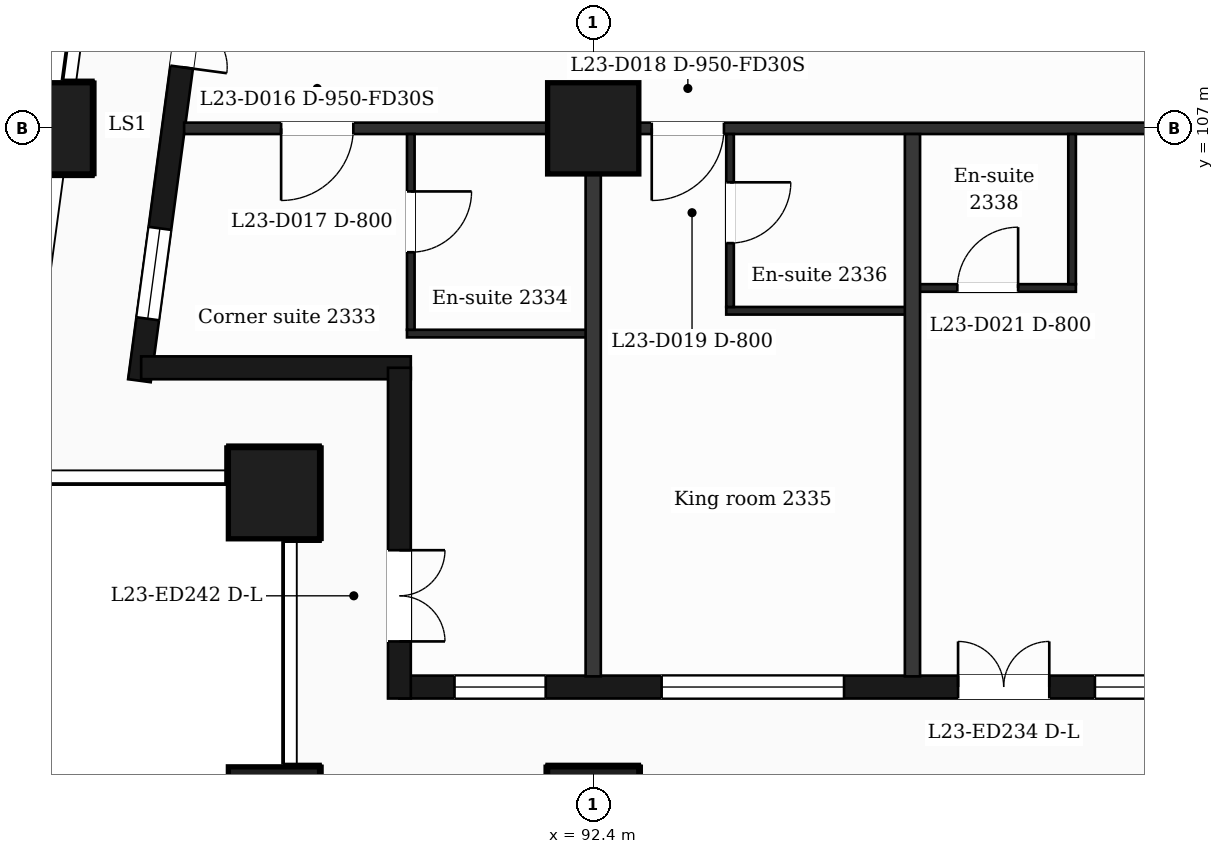
"""IFC4 building model, lengths in metres.
Left out: names, types, materials, properties, quantities, classifications, styles, units other than length and angle.
Written with IfcOpenShell. Run it as: python <this file> out.ifc"""

import sys

from ifc_helpers import new_model, si_unit, direction, frame, frame_2d, origin, origin_2d, place, context, subcontext, project, spatial, rectangle, extrude, element, fill, save


model = new_model("IFC4")
c1 = context("Model", 3, precision=1e-05, world=origin(), true_north=direction((0.0, 1.0)))
c2 = subcontext(c1, "Body", "Model", "MODEL_VIEW")
j1 = project(units=[si_unit("LENGTHUNIT", "METRE"), si_unit("PLANEANGLEUNIT", "RADIAN")], contexts=[c1])
p1 = place(None, origin())
s1 = spatial("IfcSite", under=j1, at=p1, CompositionType="ELEMENT")
p2 = place(p1, origin())
s2 = spatial("IfcBuilding", under=s1, at=p2, CompositionType="ELEMENT")
p3 = place(p2, frame((0.0, 0.0, 102.1)))
s3 = spatial("IfcBuildingStorey", under=s2, at=p3, CompositionType="ELEMENT", Elevation=102.1)
for number, where, z_axis, x_axis in (
    (1, (92.4, 98.0, 0.0), (0.0, 0.0, 1.0), (1.0, 0.0, 0.0)),
    (2, (88.2, 98.0, 0.0), (0.0, 0.0, 1.0), (1.0, 0.0, 0.0)),
    (3, (88.2, 102.2, 0.0), (0.0, 0.0, 1.0), (1.0, 0.0, 0.0)),
    (4, (92.4, 107.0, 0.0), (0.0, 0.0, 1.0), (1.0, 0.0, 0.0)),
    (5, (85.211, 107.0, 0.0), (0.0, 0.0, 1.0), (1.0, 0.0, 0.0)),
):
    element("IfcColumn", number, at=place(p3, frame(where, z_axis=z_axis, x_axis=x_axis)), inside=s3, PredefinedType="COLUMN", context=c2, shape_type="SweptSolid", body=[
        extrude(rectangle(XDim=1.2, YDim=1.2, at=origin_2d()), origin(), (0.0, 0.0, 1.0), 3.7),
    ])
p4 = place(p3, frame((89.85, 99.65, 0.0), z_axis=(0.0, 0.0, 1.0), x_axis=(1.0, 0.0, 0.0)))
e6 = element("IfcWall", 6, at=p4, inside=s3, PredefinedType="SOLIDWALL", context=c2, shape_type="SweptSolid", body=[
    extrude(rectangle(XDim=47.25, YDim=0.3, at=frame_2d((23.625, 0.0))), origin(), (0.0, 0.0, 1.0), 3.38),
])
p5 = place(p4, frame((0.725, 0.0, 0.9)))
e7 = element("IfcOpeningElement", 7, at=p5, cuts=e6, PredefinedType="OPENING", context=c2, shape_type="SweptSolid", body=[
    extrude(rectangle(XDim=1.2, YDim=2.1, at=frame_2d((0.6, 1.05))), frame((0.0, 0.16, 0.0), z_axis=(0.0, -1.0, 0.0), x_axis=(1.0, 0.0, 0.0)), (0.0, 0.0, 1.0), 0.32),
])
p6 = place(p4, frame((3.45, 0.0, 0.9)))
e8 = element("IfcOpeningElement", 8, at=p6, cuts=e6, PredefinedType="OPENING", context=c2, shape_type="SweptSolid", body=[
    extrude(rectangle(XDim=2.4, YDim=2.1, at=frame_2d((1.2, 1.05))), frame((0.0, 0.16, 0.0), z_axis=(0.0, -1.0, 0.0), x_axis=(1.0, 0.0, 0.0)), (0.0, 0.0, 1.0), 0.32),
])
p7 = place(p4, frame((7.35, 0.0, 0.0)))
e9 = element("IfcOpeningElement", 9, at=p7, cuts=e6, PredefinedType="OPENING", context=c2, shape_type="SweptSolid", body=[
    extrude(rectangle(XDim=1.2, YDim=2.4, at=frame_2d((0.6, 1.2))), frame((0.0, 0.16, 0.0), z_axis=(0.0, -1.0, 0.0), x_axis=(1.0, 0.0, 0.0)), (0.0, 0.0, 1.0), 0.32),
])
p8 = place(p4, frame((9.15, 0.0, 0.9)))
e10 = element("IfcOpeningElement", 10, at=p8, cuts=e6, PredefinedType="OPENING", context=c2, shape_type="SweptSolid", body=[
    extrude(rectangle(XDim=1.2, YDim=2.1, at=frame_2d((0.6, 1.05))), frame((0.0, 0.16, 0.0), z_axis=(0.0, -1.0, 0.0), x_axis=(1.0, 0.0, 0.0)), (0.0, 0.0, 1.0), 0.32),
])
p9 = place(p4, frame((11.85, 0.0, 0.9)))
e11 = element("IfcOpeningElement", 11, at=p9, cuts=e6, PredefinedType="OPENING", context=c2, shape_type="SweptSolid", body=[
    extrude(rectangle(XDim=2.4, YDim=2.1, at=frame_2d((1.2, 1.05))), frame((0.0, 0.16, 0.0), z_axis=(0.0, -1.0, 0.0), x_axis=(1.0, 0.0, 0.0)), (0.0, 0.0, 1.0), 0.32),
])
p10 = place(p4, frame((16.05, 0.0, 0.9)))
e12 = element("IfcOpeningElement", 12, at=p10, cuts=e6, PredefinedType="OPENING", context=c2, shape_type="SweptSolid", body=[
    extrude(rectangle(XDim=2.4, YDim=2.1, at=frame_2d((1.2, 1.05))), frame((0.0, 0.16, 0.0), z_axis=(0.0, -1.0, 0.0), x_axis=(1.0, 0.0, 0.0)), (0.0, 0.0, 1.0), 0.32),
])
p11 = place(p4, frame((20.85, 0.0, 0.9)))
e13 = element("IfcOpeningElement", 13, at=p11, cuts=e6, PredefinedType="OPENING", context=c2, shape_type="SweptSolid", body=[
    extrude(rectangle(XDim=1.2, YDim=2.1, at=frame_2d((0.6, 1.05))), frame((0.0, 0.16, 0.0), z_axis=(0.0, -1.0, 0.0), x_axis=(1.0, 0.0, 0.0)), (0.0, 0.0, 1.0), 0.32),
])
p12 = place(p4, frame((25.05, 0.0, 0.9)))
e14 = element("IfcOpeningElement", 14, at=p12, cuts=e6, PredefinedType="OPENING", context=c2, shape_type="SweptSolid", body=[
    extrude(rectangle(XDim=1.2, YDim=2.1, at=frame_2d((0.6, 1.05))), frame((0.0, 0.16, 0.0), z_axis=(0.0, -1.0, 0.0), x_axis=(1.0, 0.0, 0.0)), (0.0, 0.0, 1.0), 0.32),
])
p13 = place(p4, frame((28.65, 0.0, 0.9)))
e15 = element("IfcOpeningElement", 15, at=p13, cuts=e6, PredefinedType="OPENING", context=c2, shape_type="SweptSolid", body=[
    extrude(rectangle(XDim=2.4, YDim=2.1, at=frame_2d((1.2, 1.05))), frame((0.0, 0.16, 0.0), z_axis=(0.0, -1.0, 0.0), x_axis=(1.0, 0.0, 0.0)), (0.0, 0.0, 1.0), 0.32),
])
p14 = place(p4, frame((32.85, 0.0, 0.9)))
e16 = element("IfcOpeningElement", 16, at=p14, cuts=e6, PredefinedType="OPENING", context=c2, shape_type="SweptSolid", body=[
    extrude(rectangle(XDim=2.4, YDim=2.1, at=frame_2d((1.2, 1.05))), frame((0.0, 0.16, 0.0), z_axis=(0.0, -1.0, 0.0), x_axis=(1.0, 0.0, 0.0)), (0.0, 0.0, 1.0), 0.32),
])
p15 = place(p4, frame((37.05, 0.0, 0.9)))
e17 = element("IfcOpeningElement", 17, at=p15, cuts=e6, PredefinedType="OPENING", context=c2, shape_type="SweptSolid", body=[
    extrude(rectangle(XDim=2.4, YDim=2.1, at=frame_2d((1.2, 1.05))), frame((0.0, 0.16, 0.0), z_axis=(0.0, -1.0, 0.0), x_axis=(1.0, 0.0, 0.0)), (0.0, 0.0, 1.0), 0.32),
])
p16 = place(p4, frame((41.25, 0.0, 0.9)))
e18 = element("IfcOpeningElement", 18, at=p16, cuts=e6, PredefinedType="OPENING", context=c2, shape_type="SweptSolid", body=[
    extrude(rectangle(XDim=2.4, YDim=2.1, at=frame_2d((1.2, 1.05))), frame((0.0, 0.16, 0.0), z_axis=(0.0, -1.0, 0.0), x_axis=(1.0, 0.0, 0.0)), (0.0, 0.0, 1.0), 0.32),
])
p17 = place(p4, frame((45.25, 0.0, 0.9)))
e19 = element("IfcOpeningElement", 19, at=p17, cuts=e6, PredefinedType="OPENING", context=c2, shape_type="SweptSolid", body=[
    extrude(rectangle(XDim=1.2, YDim=2.1, at=frame_2d((0.6, 1.05))), frame((0.0, 0.16, 0.0), z_axis=(0.0, -1.0, 0.0), x_axis=(1.0, 0.0, 0.0)), (0.0, 0.0, 1.0), 0.32),
])
p18 = place(p3, frame((87.334, 110.4, 0.0), z_axis=(0.0, 0.0, 1.0), x_axis=(-0.133437175554, -0.991057273915, 0.0)))
e20 = element("IfcWall", 20, at=p18, inside=s3, PredefinedType="SOLIDWALL", context=c2, shape_type="SweptSolid", body=[
    extrude(rectangle(XDim=6.781, YDim=0.3, at=frame_2d((3.39, 0.0))), origin(), (0.0, 0.0, 1.0), 3.38),
])
p19 = place(p18, frame((1.418, 0.0, 0.0)))
e21 = element("IfcOpeningElement", 21, at=p19, cuts=e20, PredefinedType="OPENING", context=c2, shape_type="SweptSolid", body=[
    extrude(rectangle(XDim=1.2, YDim=2.4, at=frame_2d((0.6, 1.2))), frame((0.0, 0.16, 0.0), z_axis=(0.0, -1.0, 0.0), x_axis=(1.0, 0.0, 0.0)), (0.0, 0.0, 1.0), 0.32),
])
p20 = place(p18, frame((4.758, 0.0, 0.9)))
e22 = element("IfcOpeningElement", 22, at=p20, cuts=e20, PredefinedType="OPENING", context=c2, shape_type="SweptSolid", body=[
    extrude(rectangle(XDim=1.2, YDim=2.1, at=frame_2d((0.6, 1.05))), frame((0.0, 0.16, 0.0), z_axis=(0.0, -1.0, 0.0), x_axis=(1.0, 0.0, 0.0)), (0.0, 0.0, 1.0), 0.32),
])
p21 = place(p3, frame((86.452, 103.85, 0.0), z_axis=(0.0, 0.0, 1.0), x_axis=(1.0, 0.0, 0.0)))
e23 = element("IfcWall", 23, at=p21, inside=s3, PredefinedType="SOLIDWALL", context=c2, shape_type="SweptSolid", body=[
    extrude(rectangle(XDim=3.548, YDim=0.3, at=frame_2d((1.774, 0.0))), origin(), (0.0, 0.0, 1.0), 3.38),
])
p22 = place(p3, frame((89.85, 103.85, 0.0), z_axis=(0.0, 0.0, 1.0), x_axis=(0.0, -1.0, 0.0)))
e24 = element("IfcWall", 24, at=p22, inside=s3, PredefinedType="SOLIDWALL", context=c2, shape_type="SweptSolid", body=[
    extrude(rectangle(XDim=4.35, YDim=0.3, at=frame_2d((2.175, 0.0))), origin(), (0.0, 0.0, 1.0), 3.38),
])
p23 = place(p22, frame((2.4, 0.0, 0.0)))
e25 = element("IfcOpeningElement", 25, at=p23, cuts=e24, PredefinedType="OPENING", context=c2, shape_type="SweptSolid", body=[
    extrude(rectangle(XDim=1.2, YDim=2.4, at=frame_2d((0.6, 1.2))), frame((0.0, 0.16, 0.0), z_axis=(0.0, -1.0, 0.0), x_axis=(1.0, 0.0, 0.0)), (0.0, 0.0, 1.0), 0.32),
])
p24 = place(p3, frame((89.95, 104.3, 0.0), z_axis=(0.0, 0.0, 1.0), x_axis=(1.0, 0.0, 0.0)))
e26 = element("IfcWall", 26, at=p24, inside=s3, PredefinedType="PARTITIONING", context=c2, shape_type="SweptSolid", body=[
    extrude(rectangle(XDim=2.45, YDim=0.1, at=frame_2d((1.225, 0.0))), origin(), (0.0, 0.0, 1.0), 3.38),
])
p25 = place(p3, frame((94.15, 104.6, 0.0), z_axis=(0.0, 0.0, 1.0), x_axis=(1.0, 0.0, 0.0)))
e27 = element("IfcWall", 27, at=p25, inside=s3, PredefinedType="PARTITIONING", context=c2, shape_type="SweptSolid", body=[
    extrude(rectangle(XDim=2.45, YDim=0.1, at=frame_2d((1.225, 0.0))), origin(), (0.0, 0.0, 1.0), 3.38),
])
p26 = place(p3, frame((96.6, 104.9, 0.0), z_axis=(0.0, 0.0, 1.0), x_axis=(1.0, 0.0, 0.0)))
e28 = element("IfcWall", 28, at=p26, inside=s3, PredefinedType="PARTITIONING", context=c2, shape_type="SweptSolid", body=[
    extrude(rectangle(XDim=2.15, YDim=0.1, at=frame_2d((1.075, 0.0))), origin(), (0.0, 0.0, 1.0), 3.38),
])
p27 = place(p26, frame((0.59, 0.0, 0.0)))
e29 = element("IfcOpeningElement", 29, at=p27, cuts=e28, PredefinedType="OPENING", context=c2, shape_type="SweptSolid", body=[
    extrude(rectangle(XDim=0.8, YDim=2.1, at=frame_2d((0.4, 1.05))), frame((0.0, 0.06, 0.0), z_axis=(0.0, -1.0, 0.0), x_axis=(1.0, 0.0, 0.0)), (0.0, 0.0, 1.0), 0.12),
])
p28 = place(p3, frame((87.018, 107.0, 0.0), z_axis=(0.0, 0.0, 1.0), x_axis=(1.0, 0.0, 0.0)))
e30 = element("IfcWall", 30, at=p28, inside=s3, PredefinedType="PARTITIONING", context=c2, shape_type="SweptSolid", body=[
    extrude(rectangle(XDim=52.765, YDim=0.15, at=frame_2d((26.382, 0.0))), origin(), (0.0, 0.0, 1.0), 3.38),
])
p29 = place(p28, frame((1.276, 0.0, 0.0)))
e31 = element("IfcOpeningElement", 31, at=p29, cuts=e30, PredefinedType="OPENING", context=c2, shape_type="SweptSolid", body=[
    extrude(rectangle(XDim=0.95, YDim=2.1, at=frame_2d((0.475, 1.05))), frame((0.0, 0.085, 0.0), z_axis=(0.0, -1.0, 0.0), x_axis=(1.0, 0.0, 0.0)), (0.0, 0.0, 1.0), 0.17),
])
p30 = place(p28, frame((6.152, 0.0, 0.0)))
e32 = element("IfcOpeningElement", 32, at=p30, cuts=e30, PredefinedType="OPENING", context=c2, shape_type="SweptSolid", body=[
    extrude(rectangle(XDim=0.95, YDim=2.1, at=frame_2d((0.475, 1.05))), frame((0.0, 0.085, 0.0), z_axis=(0.0, -1.0, 0.0), x_axis=(1.0, 0.0, 0.0)), (0.0, 0.0, 1.0), 0.17),
])
p31 = place(p28, frame((14.59, 0.0, 0.0)))
e33 = element("IfcOpeningElement", 33, at=p31, cuts=e30, PredefinedType="OPENING", context=c2, shape_type="SweptSolid", body=[
    extrude(rectangle(XDim=0.95, YDim=2.1, at=frame_2d((0.475, 1.05))), frame((0.0, 0.085, 0.0), z_axis=(0.0, -1.0, 0.0), x_axis=(1.0, 0.0, 0.0)), (0.0, 0.0, 1.0), 0.17),
])
p32 = place(p28, frame((18.257, 0.0, 0.0)))
e34 = element("IfcOpeningElement", 34, at=p32, cuts=e30, PredefinedType="OPENING", context=c2, shape_type="SweptSolid", body=[
    extrude(rectangle(XDim=0.95, YDim=2.1, at=frame_2d((0.475, 1.05))), frame((0.0, 0.085, 0.0), z_axis=(0.0, -1.0, 0.0), x_axis=(1.0, 0.0, 0.0)), (0.0, 0.0, 1.0), 0.17),
])
p33 = place(p28, frame((26.672, 0.0, 0.0)))
e35 = element("IfcOpeningElement", 35, at=p33, cuts=e30, PredefinedType="OPENING", context=c2, shape_type="SweptSolid", body=[
    extrude(rectangle(XDim=0.95, YDim=2.1, at=frame_2d((0.475, 1.05))), frame((0.0, 0.085, 0.0), z_axis=(0.0, -1.0, 0.0), x_axis=(1.0, 0.0, 0.0)), (0.0, 0.0, 1.0), 0.17),
])
p34 = place(p28, frame((31.392, 0.0, 0.0)))
e36 = element("IfcOpeningElement", 36, at=p34, cuts=e30, PredefinedType="OPENING", context=c2, shape_type="SweptSolid", body=[
    extrude(rectangle(XDim=0.95, YDim=2.1, at=frame_2d((0.475, 1.05))), frame((0.0, 0.085, 0.0), z_axis=(0.0, -1.0, 0.0), x_axis=(1.0, 0.0, 0.0)), (0.0, 0.0, 1.0), 0.17),
])
p35 = place(p28, frame((37.182, 0.0, 0.0)))
e37 = element("IfcOpeningElement", 37, at=p35, cuts=e30, PredefinedType="OPENING", context=c2, shape_type="SweptSolid", body=[
    extrude(rectangle(XDim=0.95, YDim=2.1, at=frame_2d((0.475, 1.05))), frame((0.0, 0.085, 0.0), z_axis=(0.0, -1.0, 0.0), x_axis=(1.0, 0.0, 0.0)), (0.0, 0.0, 1.0), 0.17),
])
p36 = place(p28, frame((41.762, 0.0, 0.0)))
e38 = element("IfcOpeningElement", 38, at=p36, cuts=e30, PredefinedType="OPENING", context=c2, shape_type="SweptSolid", body=[
    extrude(rectangle(XDim=0.95, YDim=2.1, at=frame_2d((0.475, 1.05))), frame((0.0, 0.085, 0.0), z_axis=(0.0, -1.0, 0.0), x_axis=(1.0, 0.0, 0.0)), (0.0, 0.0, 1.0), 0.17),
])
p37 = place(p28, frame((49.285, 0.0, 0.0)))
e39 = element("IfcOpeningElement", 39, at=p37, cuts=e30, PredefinedType="OPENING", context=c2, shape_type="SweptSolid", body=[
    extrude(rectangle(XDim=0.95, YDim=2.1, at=frame_2d((0.475, 1.05))), frame((0.0, 0.085, 0.0), z_axis=(0.0, -1.0, 0.0), x_axis=(1.0, 0.0, 0.0)), (0.0, 0.0, 1.0), 0.17),
])
p38 = place(p3, frame((90.0, 104.35, 0.0), z_axis=(0.0, 0.0, 1.0), x_axis=(0.0, 1.0, 0.0)))
e40 = element("IfcWall", 40, at=p38, inside=s3, PredefinedType="PARTITIONING", context=c2, shape_type="SweptSolid", body=[
    extrude(rectangle(XDim=2.575, YDim=0.1, at=frame_2d((1.288, 0.0))), origin(), (0.0, 0.0, 1.0), 3.38),
])
p39 = place(p38, frame((1.02, 0.0, 0.0)))
e41 = element("IfcOpeningElement", 41, at=p39, cuts=e40, PredefinedType="OPENING", context=c2, shape_type="SweptSolid", body=[
    extrude(rectangle(XDim=0.8, YDim=2.1, at=frame_2d((0.4, 1.05))), frame((0.0, 0.06, 0.0), z_axis=(0.0, -1.0, 0.0), x_axis=(1.0, 0.0, 0.0)), (0.0, 0.0, 1.0), 0.12),
])
p40 = place(p3, frame((92.4, 99.79, 0.0), z_axis=(0.0, 0.0, 1.0), x_axis=(0.0, 1.0, 0.0)))
e42 = element("IfcWall", 42, at=p40, inside=s3, PredefinedType="PARTITIONING", context=c2, shape_type="SweptSolid", body=[
    extrude(rectangle(XDim=7.135, YDim=0.2, at=frame_2d((3.567, 0.0))), origin(), (0.0, 0.0, 1.0), 3.38),
])
p41 = place(p3, frame((94.2, 104.65, 0.0), z_axis=(0.0, 0.0, 1.0), x_axis=(0.0, 1.0, 0.0)))
e43 = element("IfcWall", 43, at=p41, inside=s3, PredefinedType="PARTITIONING", context=c2, shape_type="SweptSolid", body=[
    extrude(rectangle(XDim=2.275, YDim=0.1, at=frame_2d((1.138, 0.0))), origin(), (0.0, 0.0, 1.0), 3.38),
])
p42 = place(p41, frame((0.84, 0.0, 0.0)))
e44 = element("IfcOpeningElement", 44, at=p42, cuts=e43, PredefinedType="OPENING", context=c2, shape_type="SweptSolid", body=[
    extrude(rectangle(XDim=0.8, YDim=2.1, at=frame_2d((0.4, 1.05))), frame((0.0, 0.06, 0.0), z_axis=(0.0, -1.0, 0.0), x_axis=(1.0, 0.0, 0.0)), (0.0, 0.0, 1.0), 0.12),
])
p43 = place(p3, frame((96.6, 99.79, 0.0), z_axis=(0.0, 0.0, 1.0), x_axis=(0.0, 1.0, 0.0)))
e45 = element("IfcWall", 45, at=p43, inside=s3, PredefinedType="PARTITIONING", context=c2, shape_type="SweptSolid", body=[
    extrude(rectangle(XDim=7.135, YDim=0.2, at=frame_2d((3.567, 0.0))), origin(), (0.0, 0.0, 1.0), 3.38),
])
p44 = place(p3, frame((98.7, 104.95, 0.0), z_axis=(0.0, 0.0, 1.0), x_axis=(0.0, 1.0, 0.0)))
e46 = element("IfcWall", 46, at=p44, inside=s3, PredefinedType="PARTITIONING", context=c2, shape_type="SweptSolid", body=[
    extrude(rectangle(XDim=1.975, YDim=0.1, at=frame_2d((0.988, 0.0))), origin(), (0.0, 0.0, 1.0), 3.38),
])
p45 = place(p5, origin())
e47 = element("IfcWindow", 47, at=p45, inside=s3, PartitioningType="SINGLE_PANEL", PredefinedType="WINDOW", context=c2, shape_type="SweptSolid", body=[
    extrude(rectangle(XDim=1.2, YDim=2.1, at=frame_2d((0.6, 1.05))), frame((0.0, 0.03, 0.0), z_axis=(0.0, -1.0, 0.0), x_axis=(1.0, 0.0, 0.0)), (0.0, 0.0, 1.0), 0.06),
])
fill(e7, e47)
p46 = place(p6, origin())
e48 = element("IfcWindow", 48, at=p46, inside=s3, PartitioningType="SINGLE_PANEL", PredefinedType="WINDOW", context=c2, shape_type="SweptSolid", body=[
    extrude(rectangle(XDim=2.4, YDim=2.1, at=frame_2d((1.2, 1.05))), frame((0.0, 0.03, 0.0), z_axis=(0.0, -1.0, 0.0), x_axis=(1.0, 0.0, 0.0)), (0.0, 0.0, 1.0), 0.06),
])
fill(e8, e48)
p47 = place(p7, origin())
e49 = element("IfcDoor", 49, at=p47, inside=s3, OperationType="DOUBLE_DOOR_SINGLE_SWING", PredefinedType="DOOR", context=c2, shape_type="SweptSolid", body=[
    extrude(rectangle(XDim=1.2, YDim=2.4, at=frame_2d((0.6, 1.2))), frame((0.0, 0.025, 0.0), z_axis=(0.0, -1.0, 0.0), x_axis=(1.0, 0.0, 0.0)), (0.0, 0.0, 1.0), 0.05),
])
fill(e9, e49)
p48 = place(p8, origin())
e50 = element("IfcWindow", 50, at=p48, inside=s3, PartitioningType="SINGLE_PANEL", PredefinedType="WINDOW", context=c2, shape_type="SweptSolid", body=[
    extrude(rectangle(XDim=1.2, YDim=2.1, at=frame_2d((0.6, 1.05))), frame((0.0, 0.03, 0.0), z_axis=(0.0, -1.0, 0.0), x_axis=(1.0, 0.0, 0.0)), (0.0, 0.0, 1.0), 0.06),
])
fill(e10, e50)
p49 = place(p19, origin())
e51 = element("IfcDoor", 51, at=p49, inside=s3, OperationType="DOUBLE_DOOR_SINGLE_SWING", PredefinedType="DOOR", context=c2, shape_type="SweptSolid", body=[
    extrude(rectangle(XDim=1.2, YDim=2.4, at=frame_2d((0.6, 1.2))), frame((0.0, 0.025, 0.0), z_axis=(0.0, -1.0, 0.0), x_axis=(1.0, 0.0, 0.0)), (0.0, 0.0, 1.0), 0.05),
])
fill(e21, e51)
p50 = place(p20, origin())
e52 = element("IfcWindow", 52, at=p50, inside=s3, PartitioningType="SINGLE_PANEL", PredefinedType="WINDOW", context=c2, shape_type="SweptSolid", body=[
    extrude(rectangle(XDim=1.2, YDim=2.1, at=frame_2d((0.6, 1.05))), frame((0.0, 0.03, 0.0), z_axis=(0.0, -1.0, 0.0), x_axis=(1.0, 0.0, 0.0)), (0.0, 0.0, 1.0), 0.06),
])
fill(e22, e52)
p51 = place(p23, origin())
e53 = element("IfcDoor", 53, at=p51, inside=s3, OperationType="DOUBLE_DOOR_SINGLE_SWING", PredefinedType="DOOR", context=c2, shape_type="SweptSolid", body=[
    extrude(rectangle(XDim=1.2, YDim=2.4, at=frame_2d((0.6, 1.2))), frame((0.0, 0.025, 0.0), z_axis=(0.0, -1.0, 0.0), x_axis=(1.0, 0.0, 0.0)), (0.0, 0.0, 1.0), 0.05),
])
fill(e25, e53)
p52 = place(p29, origin())
e54 = element("IfcDoor", 54, at=p52, inside=s3, OperationType="SINGLE_SWING_LEFT", PredefinedType="DOOR", context=c2, shape_type="SweptSolid", body=[
    extrude(rectangle(XDim=0.95, YDim=2.1, at=frame_2d((0.475, 1.05))), frame((0.0, 0.025, 0.0), z_axis=(0.0, -1.0, 0.0), x_axis=(1.0, 0.0, 0.0)), (0.0, 0.0, 1.0), 0.05),
])
fill(e31, e54)
p53 = place(p39, origin())
e55 = element("IfcDoor", 55, at=p53, inside=s3, OperationType="SINGLE_SWING_RIGHT", PredefinedType="DOOR", context=c2, shape_type="SweptSolid", body=[
    extrude(rectangle(XDim=0.8, YDim=2.1, at=frame_2d((0.4, 1.05))), frame((0.0, 0.025, 0.0), z_axis=(0.0, -1.0, 0.0), x_axis=(1.0, 0.0, 0.0)), (0.0, 0.0, 1.0), 0.05),
])
fill(e41, e55)
p54 = place(p30, origin())
e56 = element("IfcDoor", 56, at=p54, inside=s3, OperationType="SINGLE_SWING_LEFT", PredefinedType="DOOR", context=c2, shape_type="SweptSolid", body=[
    extrude(rectangle(XDim=0.95, YDim=2.1, at=frame_2d((0.475, 1.05))), frame((0.0, 0.025, 0.0), z_axis=(0.0, -1.0, 0.0), x_axis=(1.0, 0.0, 0.0)), (0.0, 0.0, 1.0), 0.05),
])
fill(e32, e56)
p55 = place(p42, origin())
e57 = element("IfcDoor", 57, at=p55, inside=s3, OperationType="SINGLE_SWING_RIGHT", PredefinedType="DOOR", context=c2, shape_type="SweptSolid", body=[
    extrude(rectangle(XDim=0.8, YDim=2.1, at=frame_2d((0.4, 1.05))), frame((0.0, 0.025, 0.0), z_axis=(0.0, -1.0, 0.0), x_axis=(1.0, 0.0, 0.0)), (0.0, 0.0, 1.0), 0.05),
])
fill(e44, e57)
p56 = place(p27, origin())
e58 = element("IfcDoor", 58, at=p56, inside=s3, OperationType="SINGLE_SWING_RIGHT", PredefinedType="DOOR", context=c2, shape_type="SweptSolid", body=[
    extrude(rectangle(XDim=0.8, YDim=2.1, at=frame_2d((0.4, 1.05))), frame((0.0, 0.025, 0.0), z_axis=(0.0, -1.0, 0.0), x_axis=(1.0, 0.0, 0.0)), (0.0, 0.0, 1.0), 0.05),
])
fill(e29, e58)
save(model, sys.argv[1])
